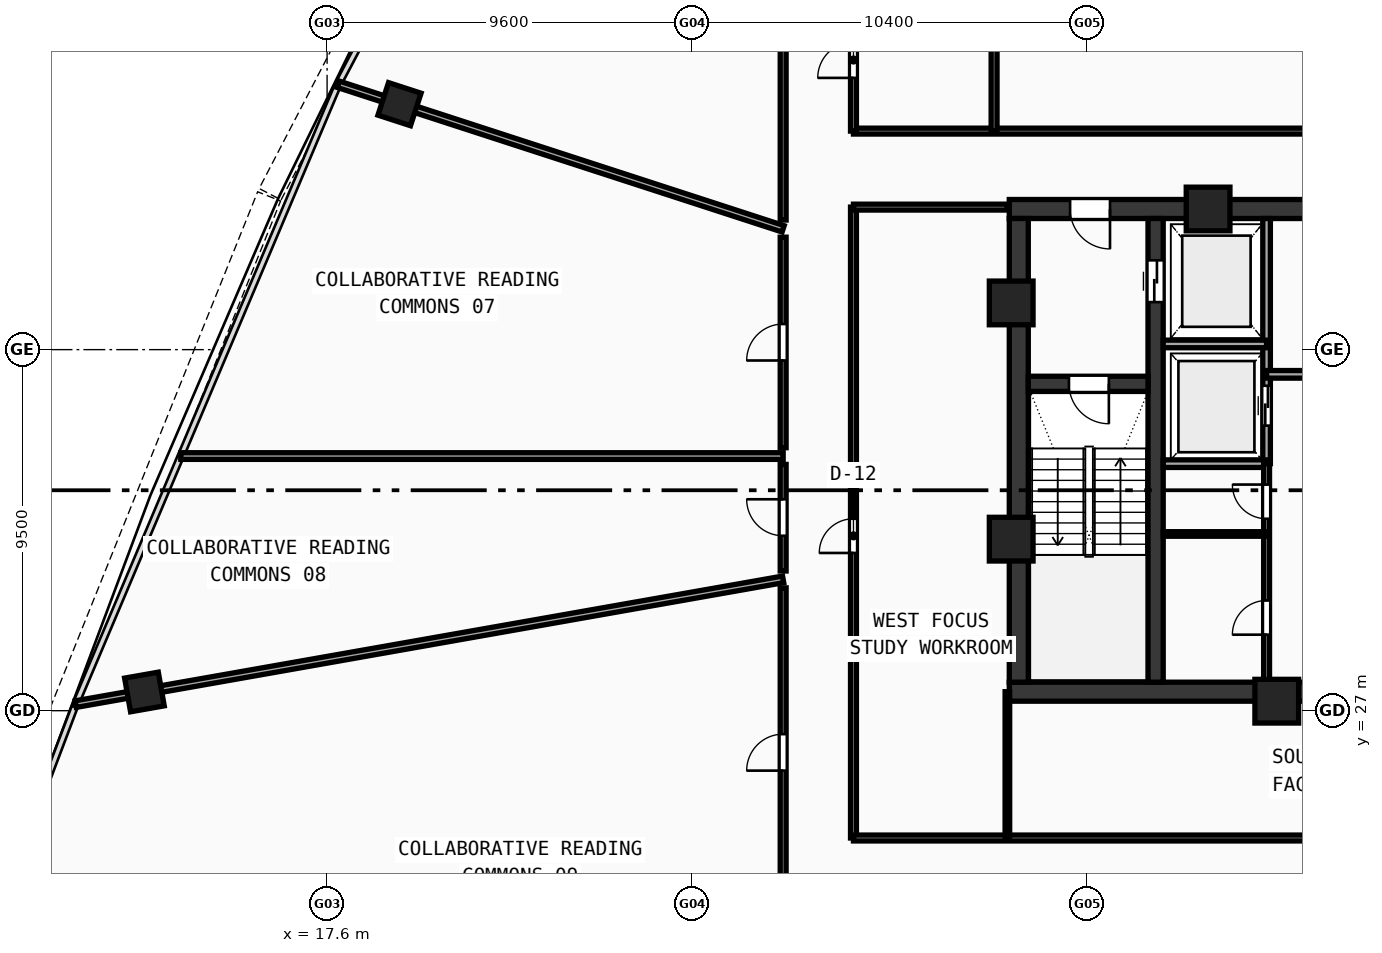
"""IFC4 building model, lengths in metres.
Left out: names, types, materials, properties, quantities, classifications, styles, units other than length and angle.
Written with IfcOpenShell. Run it as: python <this file> out.ifc"""

import sys

from ifc_helpers import new_model, si_unit, direction, frame, frame_2d, origin, origin_with_axes, origin_2d, place, context, subcontext, project, spatial, rectangle, hollow_rectangle, extrude, source, transform, mapped, element, fill, save


model = new_model("IFC4")
c1 = context("Model", 3, precision=1e-05, world=origin(), true_north=direction((0.0, 1.0)))
c2 = subcontext(c1, "Body", "Model", "MODEL_VIEW")
j1 = project(units=[si_unit("LENGTHUNIT", "METRE"), si_unit("PLANEANGLEUNIT", "RADIAN")], contexts=[c1])
p1 = place(None, origin())
s1 = spatial("IfcSite", under=j1, at=p1, CompositionType="ELEMENT")
p2 = place(p1, origin())
s2 = spatial("IfcBuilding", under=s1, at=p2, CompositionType="ELEMENT")
p3 = place(p2, frame((0.0, 0.0, 203.76)))
s3 = spatial("IfcBuildingStorey", under=s2, at=p3, CompositionType="ELEMENT", Elevation=203.76)
p4 = place(p3, frame((35.55, 27.5, 0.0), z_axis=(0.0, 0.0, 1.0), x_axis=(1.0, 0.0, 0.0)))
e1 = element("IfcWall", 1, at=p4, inside=s3, PredefinedType="SHEAR", context=c2, shape_type="SweptSolid", body=[
    extrude(rectangle(XDim=24.9, YDim=0.5, at=frame_2d((12.45, 0.0))), origin(), (0.0, 0.0, 1.0), 3.54),
])
p5 = place(p3, frame((35.55, 40.2, 0.0), z_axis=(0.0, 0.0, 1.0), x_axis=(1.0, 0.0, 0.0)))
e2 = element("IfcWall", 2, at=p5, inside=s3, PredefinedType="SHEAR", context=c2, shape_type="SweptSolid", body=[
    extrude(rectangle(XDim=11.25, YDim=0.5, at=frame_2d((5.625, 0.0))), origin(), (0.0, 0.0, 1.0), 3.54),
])
p6 = place(p5, frame((1.6, 0.0, 0.0)))
e3 = element("IfcOpeningElement", 3, at=p6, cuts=e2, PredefinedType="OPENING", context=c2, shape_type="SweptSolid", body=[
    extrude(rectangle(XDim=1.05, YDim=2.1, at=frame_2d((0.525, 1.05))), frame((0.0, 0.26, 0.0), z_axis=(0.0, -1.0, 0.0), x_axis=(1.0, 0.0, 0.0)), (0.0, 0.0, 1.0), 0.52),
])
p7 = place(p3, frame((35.8, 27.75, 0.0), z_axis=(0.0, 0.0, 1.0), x_axis=(0.0, 1.0, 0.0)))
e4 = element("IfcWall", 4, at=p7, inside=s3, PredefinedType="SHEAR", context=c2, shape_type="SweptSolid", body=[
    extrude(rectangle(XDim=12.2, YDim=0.5, at=frame_2d((6.1, 0.0))), origin(), (0.0, 0.0, 1.0), 3.54),
])
p8 = place(p3, frame((39.4, 27.75, 0.0), z_axis=(0.0, 0.0, 1.0), x_axis=(0.0, 1.0, 0.0)))
e5 = element("IfcWall", 5, at=p8, inside=s3, PredefinedType="SHEAR", context=c2, shape_type="SweptSolid", body=[
    extrude(rectangle(XDim=12.2, YDim=0.4, at=frame_2d((6.1, 0.0))), origin(), (0.0, 0.0, 1.0), 3.54),
])
p9 = place(p8, frame((10.0, 0.0, 0.0)))
e6 = element("IfcOpeningElement", 6, at=p9, cuts=e5, PredefinedType="OPENING", context=c2, shape_type="SweptSolid", body=[
    extrude(rectangle(XDim=1.1, YDim=2.1, at=frame_2d((0.55, 1.05))), frame((0.0, 0.21, 0.0), z_axis=(0.0, -1.0, 0.0), x_axis=(1.0, 0.0, 0.0)), (0.0, 0.0, 1.0), 0.42),
])
p10 = place(p3, frame((36.05, 35.6, 0.0), z_axis=(0.0, 0.0, 1.0), x_axis=(1.0, 0.0, 0.0)))
e7 = element("IfcWall", 7, at=p10, inside=s3, PredefinedType="SHEAR", context=c2, shape_type="SweptSolid", body=[
    extrude(rectangle(XDim=3.15, YDim=0.4, at=frame_2d((1.575, 0.0))), origin(), (0.0, 0.0, 1.0), 3.54),
])
p11 = place(p10, frame((1.07, 0.0, 0.0)))
e8 = element("IfcOpeningElement", 8, at=p11, cuts=e7, PredefinedType="OPENING", context=c2, shape_type="SweptSolid", body=[
    extrude(rectangle(XDim=1.05, YDim=2.1, at=frame_2d((0.525, 1.05))), frame((0.0, 0.21, 0.0), z_axis=(0.0, -1.0, 0.0), x_axis=(1.0, 0.0, 0.0)), (0.0, 0.0, 1.0), 0.42),
])
m1 = source(origin(), c2, "Body", "SweptSolid", [
    extrude(hollow_rectangle(XDim=1.15, YDim=1.15, WallThickness=0.048, at=origin_2d()), origin(), (0.0, 0.0, 1.0), 3.8),
])
for number, where, z_axis, x_axis in (
    (9, (42.588, 27.25, -0.26), (0.0, 0.0, 1.0), (1.0, 0.0, 0.0)),
    (10, (40.781, 40.2, -0.26), (0.0, 0.0, 1.0), (1.0, 0.0, 0.0)),
    (11, (35.6, 37.729, -0.26), (0.0, 0.0, 1.0), (1.0, 0.0, 0.0)),
    (12, (35.6, 31.513, -0.26), (0.0, 0.0, 1.0), (1.0, 0.0, 0.0)),
):
    element("IfcColumn", number, at=place(p3, frame(where, z_axis=z_axis, x_axis=x_axis)), inside=s3, PredefinedType="COLUMN", context=c2, shape_type="MappedRepresentation", body=[
        mapped(m1, transform((0.0, 0.0, 0.0), scale=1.0)),
    ])
m2 = source(origin(), c2, "Body", "SweptSolid", [
    extrude(hollow_rectangle(XDim=0.9, YDim=0.9, WallThickness=0.036, at=origin_2d()), origin(), (0.0, 0.0, 1.0), 3.8),
])
for number, where, z_axis, x_axis in (
    (13, (19.505, 42.958, -0.26), (0.0, 0.0, 1.0), (-0.309, -0.951, 0.0)),
    (14, (12.793, 27.492, -0.26), (0.0, 0.0, 1.0), (0.174, -0.985, 0.0)),
):
    element("IfcColumn", number, at=place(p3, frame(where, z_axis=z_axis, x_axis=x_axis)), inside=s3, PredefinedType="COLUMN", context=c2, shape_type="MappedRepresentation", body=[
        mapped(m2, transform((0.0, 0.0, 0.0), scale=1.0)),
    ])
p12 = place(p3, frame((42.32, 33.5, 0.0), z_axis=(0.0, 0.0, 1.0), x_axis=(0.0, 1.0, 0.0)))
e15 = element("IfcWall", 15, at=p12, inside=s3, PredefinedType="SOLIDWALL", context=c2, shape_type="SweptSolid", body=[
    extrude(rectangle(XDim=6.45, YDim=0.2, at=frame_2d((3.225, 0.0))), origin(), (0.0, 0.0, 1.0), 3.54),
])
p13 = place(p12, frame((1.0, 0.0, 0.0)))
e16 = element("IfcOpeningElement", 16, at=p13, cuts=e15, PredefinedType="OPENING", context=c2, shape_type="SweptSolid", body=[
    extrude(rectangle(XDim=1.05, YDim=2.1, at=frame_2d((0.525, 1.05))), frame((0.0, 0.11, 0.0), z_axis=(0.0, -1.0, 0.0), x_axis=(1.0, 0.0, 0.0)), (0.0, 0.0, 1.0), 0.22),
])
for number, where, z_axis, x_axis in (
    (17, (39.6, 36.65, 0.0), (0.0, 0.0, 1.0), (1.0, 0.0, 0.0)),
    (18, (39.6, 33.5, 0.0), (0.0, 0.0, 1.0), (1.0, 0.0, 0.0)),
):
    element("IfcWall", number, at=place(p3, frame(where, z_axis=z_axis, x_axis=x_axis)), inside=s3, PredefinedType="SOLIDWALL", context=c2, shape_type="SweptSolid", body=[
        extrude(rectangle(XDim=2.72, YDim=0.2, at=frame_2d((1.36, 0.0))), origin(), (0.0, 0.0, 1.0), 3.54),
    ])
p14 = place(p3, frame((42.32, 35.85, 0.0), z_axis=(0.0, 0.0, 1.0), x_axis=(1.0, 0.0, 0.0)))
e19 = element("IfcWall", 19, at=p14, inside=s3, PredefinedType="SOLIDWALL", context=c2, shape_type="SweptSolid", body=[
    extrude(rectangle(XDim=4.73, YDim=0.2, at=frame_2d((2.365, 0.0))), origin(), (0.0, 0.0, 1.0), 3.54),
])
p15 = place(p14, frame((1.8, 0.0, 0.0)))
e20 = element("IfcOpeningElement", 20, at=p15, cuts=e19, PredefinedType="OPENING", context=c2, shape_type="SweptSolid", body=[
    extrude(rectangle(XDim=0.9, YDim=2.1, at=frame_2d((0.45, 1.05))), frame((0.0, 0.11, 0.0), z_axis=(0.0, -1.0, 0.0), x_axis=(1.0, 0.0, 0.0)), (0.0, 0.0, 1.0), 0.22),
])
p16 = place(p3, frame((42.32, 27.6, 0.0), z_axis=(0.0, 0.0, 1.0), x_axis=(0.0, 1.0, 0.0)))
e21 = element("IfcWall", 21, at=p16, inside=s3, PredefinedType="PARTITIONING", context=c2, shape_type="SweptSolid", body=[
    extrude(rectangle(XDim=5.9, YDim=0.155, at=frame_2d((2.95, 0.0))), origin(), (0.0, 0.0, 1.0), 3.54),
])
p17 = place(p16, frame((1.4, 0.0, 0.0)))
e22 = element("IfcOpeningElement", 22, at=p17, cuts=e21, PredefinedType="OPENING", context=c2, shape_type="SweptSolid", body=[
    extrude(rectangle(XDim=0.9, YDim=2.1, at=frame_2d((0.45, 1.05))), frame((0.0, 0.087, 0.0), z_axis=(0.0, -1.0, 0.0), x_axis=(1.0, 0.0, 0.0)), (0.0, 0.0, 1.0), 0.175),
])
p18 = place(p16, frame((4.45, 0.0, 0.0)))
e23 = element("IfcOpeningElement", 23, at=p18, cuts=e21, PredefinedType="OPENING", context=c2, shape_type="SweptSolid", body=[
    extrude(rectangle(XDim=0.9, YDim=2.1, at=frame_2d((0.45, 1.05))), frame((0.0, 0.087, 0.0), z_axis=(0.0, -1.0, 0.0), x_axis=(1.0, 0.0, 0.0)), (0.0, 0.0, 1.0), 0.175),
])
p19 = place(p3, frame((39.6, 31.65, 0.0), z_axis=(0.0, 0.0, 1.0), x_axis=(1.0, 0.0, 0.0)))
e24 = element("IfcWall", 24, at=p19, inside=s3, PredefinedType="PARTITIONING", context=c2, shape_type="SweptSolid", body=[
    extrude(rectangle(XDim=2.72, YDim=0.12, at=frame_2d((1.36, 0.0))), origin(), (0.0, 0.0, 1.0), 3.54),
])
p20 = place(p3, frame((31.45, 42.25, 0.0), z_axis=(0.0, 0.0, 1.0), x_axis=(1.0, 0.0, 0.0)))
e25 = element("IfcWall", 25, at=p20, inside=s3, PredefinedType="PARTITIONING", context=c2, shape_type="SweptSolid", body=[
    extrude(rectangle(XDim=33.1, YDim=0.155, at=frame_2d((16.55, 0.0))), origin(), (0.0, 0.0, 1.0), 2.89),
])
p21 = place(p3, frame((31.45, 42.25, 0.0), z_axis=(0.0, 0.0, 1.0), x_axis=(0.0, 1.0, 0.0)))
e26 = element("IfcWall", 26, at=p21, inside=s3, PredefinedType="PARTITIONING", context=c2, shape_type="SweptSolid", body=[
    extrude(rectangle(XDim=11.7, YDim=0.155, at=frame_2d((5.85, 0.0))), origin(), (0.0, 0.0, 1.0), 2.89),
])
p22 = place(p21, frame((1.4, 0.0, 0.0)))
e27 = element("IfcOpeningElement", 27, at=p22, cuts=e26, PredefinedType="OPENING", context=c2, shape_type="SweptSolid", body=[
    extrude(rectangle(XDim=0.94, YDim=2.1, at=frame_2d((0.47, 1.05))), frame((0.0, 0.087, 0.0), z_axis=(0.0, -1.0, 0.0), x_axis=(1.0, 0.0, 0.0)), (0.0, 0.0, 1.0), 0.175),
])
p23 = place(p21, frame((6.8, 0.0, 0.0)))
e28 = element("IfcOpeningElement", 28, at=p23, cuts=e26, PredefinedType="OPENING", context=c2, shape_type="SweptSolid", body=[
    extrude(rectangle(XDim=0.92, YDim=2.1, at=frame_2d((0.46, 1.05))), frame((0.0, 0.087, 0.0), z_axis=(0.0, -1.0, 0.0), x_axis=(1.0, 0.0, 0.0)), (0.0, 0.0, 1.0), 0.175),
])
p24 = place(p3, frame((35.15, 42.25, 0.0), z_axis=(0.0, 0.0, 1.0), x_axis=(0.0, 1.0, 0.0)))
e29 = element("IfcWall", 29, at=p24, inside=s3, PredefinedType="PARTITIONING", context=c2, shape_type="SweptSolid", body=[
    extrude(rectangle(XDim=11.7, YDim=0.155, at=frame_2d((5.85, 0.0))), origin(), (0.0, 0.0, 1.0), 2.89),
])
p25 = place(p3, frame((31.45, 23.65, 0.0), z_axis=(0.0, 0.0, 1.0), x_axis=(0.0, 1.0, 0.0)))
e30 = element("IfcWall", 30, at=p25, inside=s3, PredefinedType="PARTITIONING", context=c2, shape_type="SweptSolid", body=[
    extrude(rectangle(XDim=16.6, YDim=0.155, at=frame_2d((8.3, 0.0))), origin(), (0.0, 0.0, 1.0), 2.89),
])
p26 = place(p25, frame((7.5, 0.0, 0.0)))
e31 = element("IfcOpeningElement", 31, at=p26, cuts=e30, PredefinedType="OPENING", context=c2, shape_type="SweptSolid", body=[
    extrude(rectangle(XDim=0.9, YDim=2.08, at=frame_2d((0.45, 1.04))), frame((0.0, 0.087, 0.0), z_axis=(0.0, -1.0, 0.0), x_axis=(1.0, 0.0, 0.0)), (0.0, 0.0, 1.0), 0.175),
])
p27 = place(p3, frame((31.45, 23.65, 0.0), z_axis=(0.0, 0.0, 1.0), x_axis=(1.0, 0.0, 0.0)))
e32 = element("IfcWall", 32, at=p27, inside=s3, PredefinedType="PARTITIONING", context=c2, shape_type="SweptSolid", body=[
    extrude(rectangle(XDim=33.1, YDim=0.155, at=frame_2d((16.55, 0.0))), origin(), (0.0, 0.0, 1.0), 2.89),
])
p28 = place(p27, frame((16.0, 0.0, 0.0)))
e33 = element("IfcOpeningElement", 33, at=p28, cuts=e32, PredefinedType="OPENING", context=c2, shape_type="SweptSolid", body=[
    extrude(rectangle(XDim=0.92, YDim=2.1, at=frame_2d((0.46, 1.05))), frame((0.0, 0.087, 0.0), z_axis=(0.0, -1.0, 0.0), x_axis=(1.0, 0.0, 0.0)), (0.0, 0.0, 1.0), 0.175),
])
p29 = place(p3, frame((31.45, 40.25, 0.0), z_axis=(0.0, 0.0, 1.0), x_axis=(1.0, 0.0, 0.0)))
e34 = element("IfcWall", 34, at=p29, inside=s3, PredefinedType="PARTITIONING", context=c2, shape_type="SweptSolid", body=[
    extrude(rectangle(XDim=4.05, YDim=0.155, at=frame_2d((2.025, 0.0))), origin(), (0.0, 0.0, 1.0), 3.54),
])
p30 = place(p3, frame((35.5, 23.65, 0.0), z_axis=(0.0, 0.0, 1.0), x_axis=(0.0, 1.0, 0.0)))
e35 = element("IfcWall", 35, at=p30, inside=s3, PredefinedType="PARTITIONING", context=c2, shape_type="SweptSolid", body=[
    extrude(rectangle(XDim=3.85, YDim=0.12, at=frame_2d((1.925, 0.0))), origin(), (0.0, 0.0, 1.0), 3.14),
])
p31 = place(p3, frame((29.6, 39.678, 0.0), z_axis=(0.0, 0.0, 1.0), x_axis=(-0.951057676857, 0.309013422511, 0.0)))
e36 = element("IfcWall", 36, at=p31, inside=s3, PredefinedType="PARTITIONING", context=c2, shape_type="SweptSolid", body=[
    extrude(rectangle(XDim=12.31, YDim=0.175, at=frame_2d((6.155, 0.0))), origin(), (0.0, 0.0, 1.0), 2.89),
])
p32 = place(p3, frame((29.6, 33.7, 0.0), z_axis=(0.0, 0.0, 1.0), x_axis=(-1.0, 0.0, 0.0)))
e37 = element("IfcWall", 37, at=p32, inside=s3, PredefinedType="PARTITIONING", context=c2, shape_type="SweptSolid", body=[
    extrude(rectangle(XDim=15.851, YDim=0.175, at=frame_2d((7.925, 0.0))), origin(), (0.0, 0.0, 1.0), 2.89),
])
p33 = place(p3, frame((29.6, 30.456, 0.0), z_axis=(0.0, 0.0, 1.0), x_axis=(-0.984807864876, -0.173647543254, 0.0)))
e38 = element("IfcWall", 38, at=p33, inside=s3, PredefinedType="PARTITIONING", context=c2, shape_type="SweptSolid", body=[
    extrude(rectangle(XDim=18.902, YDim=0.175, at=frame_2d((9.451, 0.0))), origin(), (0.0, 0.0, 1.0), 2.89),
])
p34 = place(p3, frame((29.6, 21.8, 0.0), z_axis=(0.0, 0.0, 1.0), x_axis=(0.0, 1.0, 0.0)))
e39 = element("IfcWall", 39, at=p34, inside=s3, PredefinedType="PARTITIONING", context=c2, shape_type="SweptSolid", body=[
    extrude(rectangle(XDim=8.432, YDim=0.155, at=frame_2d((4.216, 0.0))), origin(), (0.0, 0.0, 1.0), 3.14),
])
p35 = place(p34, frame((3.623, 0.0, 0.0)))
e40 = element("IfcOpeningElement", 40, at=p35, cuts=e39, PredefinedType="OPENING", context=c2, shape_type="SweptSolid", body=[
    extrude(rectangle(XDim=0.96, YDim=2.12, at=frame_2d((0.48, 1.06))), frame((0.0, 0.087, 0.0), z_axis=(0.0, -1.0, 0.0), x_axis=(1.0, 0.0, 0.0)), (0.0, 0.0, 1.0), 0.175),
])
p36 = place(p3, frame((29.6, 30.675, 0.0), z_axis=(0.0, 0.0, 1.0), x_axis=(0.0, 1.0, 0.0)))
e41 = element("IfcWall", 41, at=p36, inside=s3, PredefinedType="PARTITIONING", context=c2, shape_type="SweptSolid", body=[
    extrude(rectangle(XDim=2.805, YDim=0.155, at=frame_2d((1.402, 0.0))), origin(), (0.0, 0.0, 1.0), 3.54),
])
p37 = place(p36, frame((0.927, 0.0, 0.0)))
e42 = element("IfcOpeningElement", 42, at=p37, cuts=e41, PredefinedType="OPENING", context=c2, shape_type="SweptSolid", body=[
    extrude(rectangle(XDim=0.96, YDim=2.12, at=frame_2d((0.48, 1.06))), frame((0.0, 0.087, 0.0), z_axis=(0.0, -1.0, 0.0), x_axis=(1.0, 0.0, 0.0)), (0.0, 0.0, 1.0), 0.175),
])
p38 = place(p3, frame((29.6, 33.92, 0.0), z_axis=(0.0, 0.0, 1.0), x_axis=(0.0, 1.0, 0.0)))
e43 = element("IfcWall", 43, at=p38, inside=s3, PredefinedType="PARTITIONING", context=c2, shape_type="SweptSolid", body=[
    extrude(rectangle(XDim=5.539, YDim=0.155, at=frame_2d((2.77, 0.0))), origin(), (0.0, 0.0, 1.0), 3.14),
])
p39 = place(p38, frame((2.294, 0.0, 0.0)))
e44 = element("IfcOpeningElement", 44, at=p39, cuts=e43, PredefinedType="OPENING", context=c2, shape_type="SweptSolid", body=[
    extrude(rectangle(XDim=0.96, YDim=2.12, at=frame_2d((0.48, 1.06))), frame((0.0, 0.087, 0.0), z_axis=(0.0, -1.0, 0.0), x_axis=(1.0, 0.0, 0.0)), (0.0, 0.0, 1.0), 0.175),
])
p40 = place(p3, frame((29.6, 39.91, 0.0), z_axis=(0.0, 0.0, 1.0), x_axis=(0.0, 1.0, 0.0)))
e45 = element("IfcWall", 45, at=p40, inside=s3, PredefinedType="PARTITIONING", context=c2, shape_type="SweptSolid", body=[
    extrude(rectangle(XDim=10.138, YDim=0.155, at=frame_2d((5.069, 0.0))), origin(), (0.0, 0.0, 1.0), 2.89),
])
p41 = place(p40, frame((4.588, 0.0, 0.0)))
e46 = element("IfcOpeningElement", 46, at=p41, cuts=e45, PredefinedType="OPENING", context=c2, shape_type="SweptSolid", body=[
    extrude(rectangle(XDim=0.96, YDim=2.12, at=frame_2d((0.48, 1.06))), frame((0.0, 0.087, 0.0), z_axis=(0.0, -1.0, 0.0), x_axis=(1.0, 0.0, 0.0)), (0.0, 0.0, 1.0), 0.175),
])
m3 = source(origin(), c2, "Body", "SweptSolid", [
    extrude(rectangle(XDim=1.05, YDim=2.1, at=frame_2d((0.525, 1.05))), frame((0.0, 0.025, 0.0), z_axis=(0.0, -1.0, 0.0), x_axis=(1.0, 0.0, 0.0)), (0.0, 0.0, 1.0), 0.05),
])
p42 = place(p11, frame((1.05, 0.0, 0.0), z_axis=(0.0, 0.0, 1.0), x_axis=(-1.0, 0.0, 0.0)))
e47 = element("IfcDoor", 47, at=p42, inside=s3, OperationType="SINGLE_SWING_LEFT", PredefinedType="DOOR", context=c2, shape_type="MappedRepresentation", body=[
    mapped(m3, transform((0.0, 0.0, 0.0), scale=1.0)),
])
fill(e8, e47)
p43 = place(p6, frame((1.05, 0.0, 0.0), z_axis=(0.0, 0.0, 1.0), x_axis=(-1.0, 0.0, 0.0)))
e48 = element("IfcDoor", 48, at=p43, inside=s3, OperationType="SINGLE_SWING_LEFT", PredefinedType="DOOR", context=c2, shape_type="MappedRepresentation", body=[
    mapped(m3, transform((0.0, 0.0, 0.0), scale=1.0)),
])
fill(e3, e48)
m4 = source(origin(), c2, "Body", "SweptSolid", [
    extrude(rectangle(XDim=1.1, YDim=2.1, at=frame_2d((0.55, 1.05))), frame((0.0, 0.025, 0.0), z_axis=(0.0, -1.0, 0.0), x_axis=(1.0, 0.0, 0.0)), (0.0, 0.0, 1.0), 0.05),
])
p44 = place(p9, frame((1.1, 0.0, 0.0), z_axis=(0.0, 0.0, 1.0), x_axis=(-1.0, 0.0, 0.0)))
e49 = element("IfcDoor", 49, at=p44, inside=s3, OperationType="DOUBLE_DOOR_SLIDING", PredefinedType="DOOR", context=c2, shape_type="MappedRepresentation", body=[
    mapped(m4, transform((0.0, 0.0, 0.0), scale=1.0)),
])
fill(e6, e49)
p45 = place(p13, origin_with_axes())
e50 = element("IfcDoor", 50, at=p45, inside=s3, OperationType="DOUBLE_DOOR_SLIDING", PredefinedType="DOOR", context=c2, shape_type="MappedRepresentation", body=[
    mapped(m3, transform((0.0, 0.0, 0.0), scale=1.0)),
])
fill(e16, e50)
m5 = source(origin(), c2, "Body", "SweptSolid", [
    extrude(rectangle(XDim=0.9, YDim=2.1, at=frame_2d((0.45, 1.05))), frame((0.0, 0.025, 0.0), z_axis=(0.0, -1.0, 0.0), x_axis=(1.0, 0.0, 0.0)), (0.0, 0.0, 1.0), 0.05),
])
p46 = place(p17, origin_with_axes())
e51 = element("IfcDoor", 51, at=p46, inside=s3, OperationType="SINGLE_SWING_LEFT", PredefinedType="DOOR", context=c2, shape_type="MappedRepresentation", body=[
    mapped(m5, transform((0.0, 0.0, 0.0), scale=1.0)),
])
fill(e22, e51)
p47 = place(p18, origin_with_axes())
e52 = element("IfcDoor", 52, at=p47, inside=s3, OperationType="SINGLE_SWING_RIGHT", PredefinedType="DOOR", context=c2, shape_type="MappedRepresentation", body=[
    mapped(m5, transform((0.0, 0.0, 0.0), scale=1.0)),
])
fill(e23, e52)
m6 = source(origin(), c2, "Body", "SweptSolid", [
    extrude(rectangle(XDim=0.94, YDim=2.1, at=frame_2d((0.47, 1.05))), frame((0.0, 0.025, 0.0), z_axis=(0.0, -1.0, 0.0), x_axis=(1.0, 0.0, 0.0)), (0.0, 0.0, 1.0), 0.05),
])
p48 = place(p22, origin_with_axes())
e53 = element("IfcDoor", 53, at=p48, inside=s3, OperationType="SINGLE_SWING_LEFT", PredefinedType="DOOR", context=c2, shape_type="MappedRepresentation", body=[
    mapped(m6, transform((0.0, 0.0, 0.0), scale=1.0)),
])
fill(e27, e53)
m7 = source(origin(), c2, "Body", "SweptSolid", [
    extrude(rectangle(XDim=0.9, YDim=2.08, at=frame_2d((0.45, 1.04))), frame((0.0, 0.025, 0.0), z_axis=(0.0, -1.0, 0.0), x_axis=(1.0, 0.0, 0.0)), (0.0, 0.0, 1.0), 0.05),
])
p49 = place(p26, origin_with_axes())
e54 = element("IfcDoor", 54, at=p49, inside=s3, OperationType="SINGLE_SWING_LEFT", PredefinedType="DOOR", context=c2, shape_type="MappedRepresentation", body=[
    mapped(m7, transform((0.0, 0.0, 0.0), scale=1.0)),
])
fill(e31, e54)
m8 = source(origin(), c2, "Body", "SweptSolid", [
    extrude(rectangle(XDim=0.96, YDim=2.12, at=frame_2d((0.48, 1.06))), frame((0.0, 0.025, 0.0), z_axis=(0.0, -1.0, 0.0), x_axis=(1.0, 0.0, 0.0)), (0.0, 0.0, 1.0), 0.05),
])
p50 = place(p39, origin_with_axes())
e55 = element("IfcDoor", 55, at=p50, inside=s3, OperationType="SINGLE_SWING_LEFT", PredefinedType="DOOR", context=c2, shape_type="MappedRepresentation", body=[
    mapped(m8, transform((0.0, 0.0, 0.0), scale=1.0)),
])
fill(e44, e55)
p51 = place(p37, origin_with_axes())
e56 = element("IfcDoor", 56, at=p51, inside=s3, OperationType="SINGLE_SWING_RIGHT", PredefinedType="DOOR", context=c2, shape_type="MappedRepresentation", body=[
    mapped(m8, transform((0.0, 0.0, 0.0), scale=1.0)),
])
fill(e42, e56)
p52 = place(p35, origin_with_axes())
e57 = element("IfcDoor", 57, at=p52, inside=s3, OperationType="SINGLE_SWING_LEFT", PredefinedType="DOOR", context=c2, shape_type="MappedRepresentation", body=[
    mapped(m8, transform((0.0, 0.0, 0.0), scale=1.0)),
])
fill(e40, e57)
save(model, sys.argv[1])
